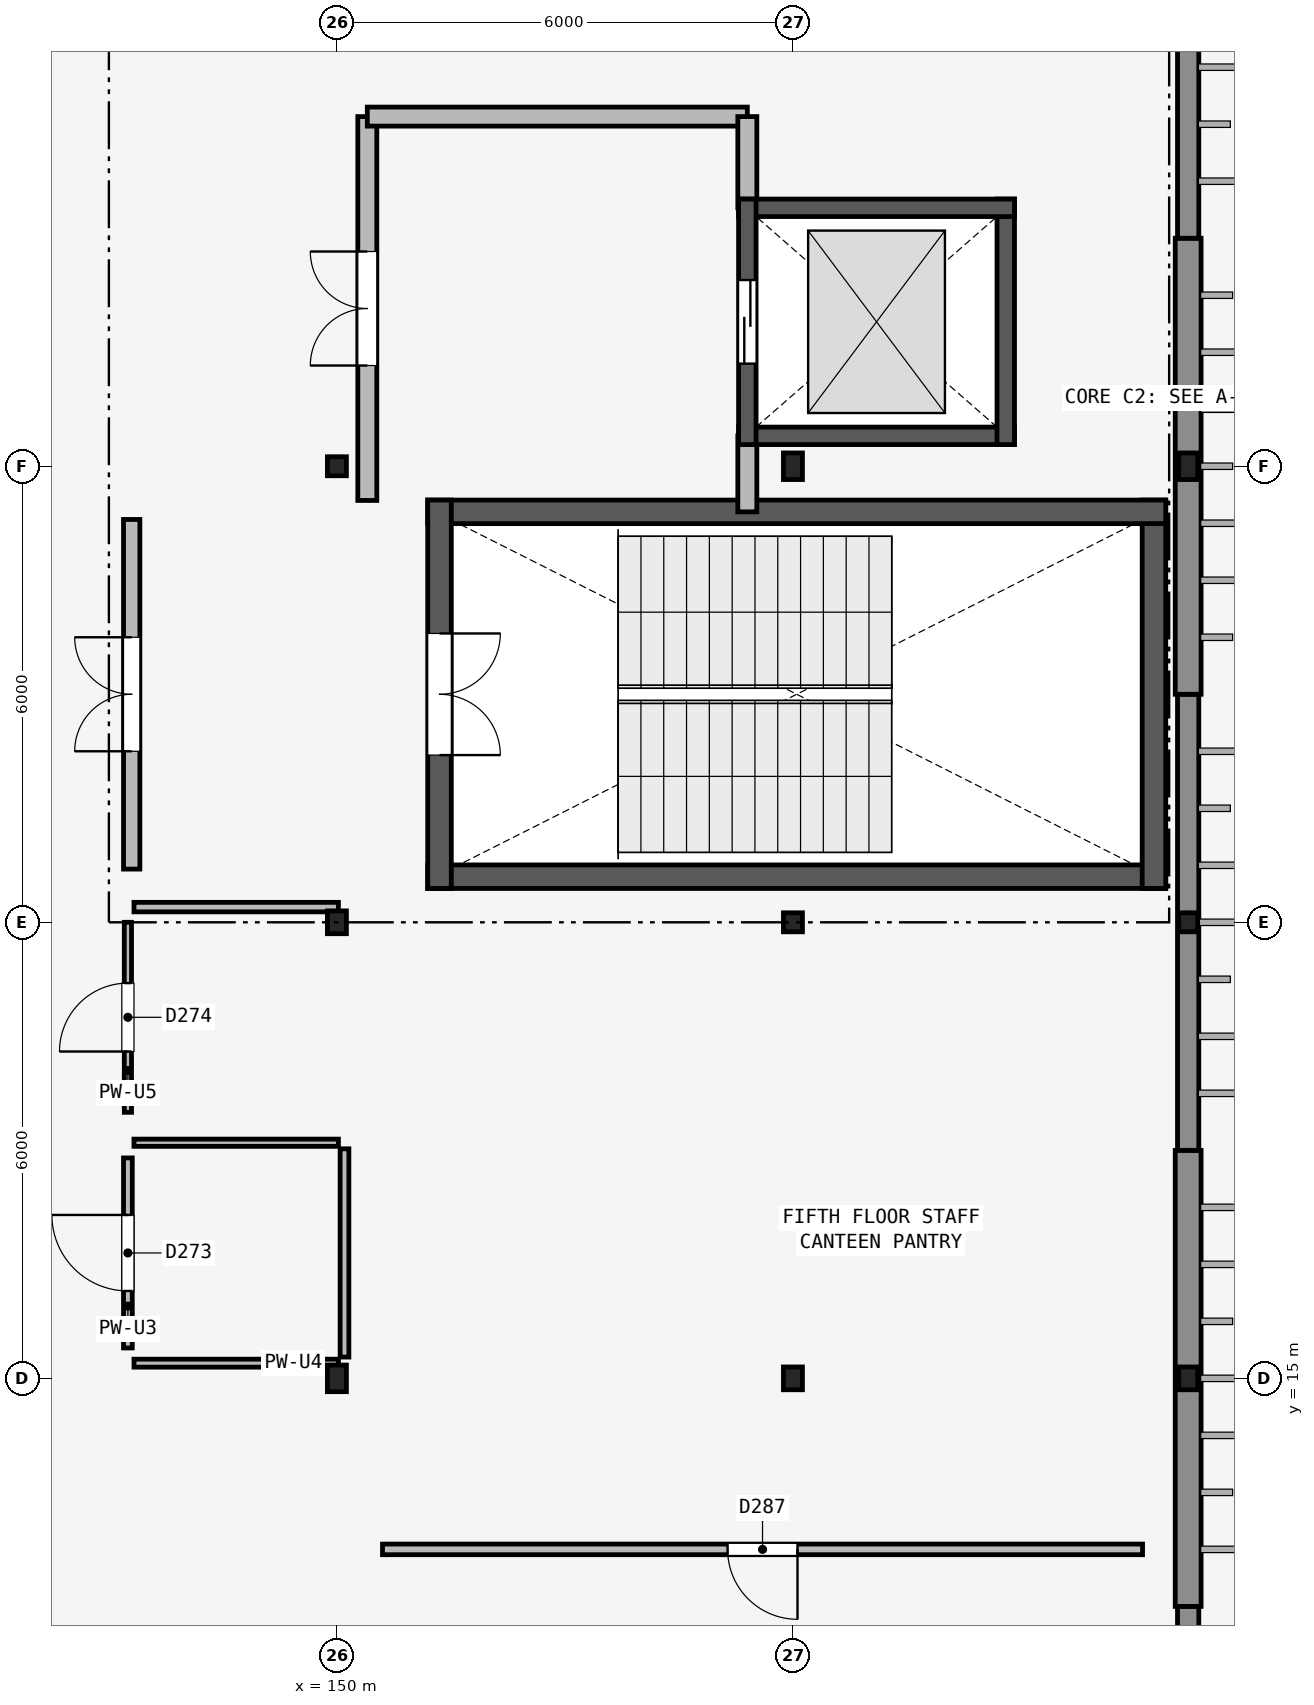
"""IFC4 building model, lengths in metres.
Left out: names, types, materials, properties, quantities, classifications, styles, units other than length and angle.
Written with IfcOpenShell. Run it as: python <this file> out.ifc"""

import sys

from ifc_helpers import new_model, si_unit, direction, frame, frame_2d, origin, origin_2d, place, context, subcontext, project, spatial, rectangle, hollow_rectangle, i_section, extrude, element, fill, save


model = new_model("IFC4")
c1 = context("Model", 3, precision=1e-05, world=origin(), true_north=direction((0.0, 1.0)))
c2 = subcontext(c1, "Body", "Model", "MODEL_VIEW")
j1 = project(units=[si_unit("LENGTHUNIT", "METRE"), si_unit("PLANEANGLEUNIT", "RADIAN")], contexts=[c1])
p1 = place(None, origin())
s1 = spatial("IfcSite", under=j1, at=p1, CompositionType="ELEMENT")
p2 = place(p1, origin())
s2 = spatial("IfcBuilding", under=s1, at=p2, CompositionType="ELEMENT")
p3 = place(p2, frame((0.0, 0.0, 22.2)))
s3 = spatial("IfcBuildingStorey", under=s2, at=p3, CompositionType="ELEMENT", Elevation=22.2)
p4 = place(p3, frame((150.0, 15.0, 0.0), z_axis=(0.0, 0.0, 1.0), x_axis=(1.0, 0.0, 0.0)))
e1 = element("IfcColumn", 1, at=p4, inside=s3, PredefinedType="COLUMN", context=c2, shape_type="SweptSolid", body=[
    extrude(i_section(OverallWidth=0.25, OverallDepth=0.35, WebThickness=0.01, FlangeThickness=0.012, FilletRadius=0.012, at=origin_2d()), origin(), (0.0, 0.0, 1.0), 3.9),
])
p5 = place(p3, frame((150.0, 21.0, 0.0), z_axis=(0.0, 0.0, 1.0), x_axis=(1.0, 0.0, 0.0)))
e2 = element("IfcColumn", 2, at=p5, inside=s3, PredefinedType="COLUMN", context=c2, shape_type="SweptSolid", body=[
    extrude(i_section(OverallWidth=0.25, OverallDepth=0.3, WebThickness=0.01, FlangeThickness=0.01, FilletRadius=0.012, at=origin_2d()), origin(), (0.0, 0.0, 1.0), 3.9),
])
p6 = place(p3, frame((150.0, 27.0, 0.0), z_axis=(0.0, 0.0, 1.0), x_axis=(1.0, 0.0, 0.0)))
e3 = element("IfcColumn", 3, at=p6, inside=s3, PredefinedType="COLUMN", context=c2, shape_type="SweptSolid", body=[
    extrude(hollow_rectangle(XDim=0.25, YDim=0.25, WallThickness=0.012, InnerFilletRadius=0.012, OuterFilletRadius=0.024, at=origin_2d()), origin(), (0.0, 0.0, 1.0), 3.9),
])
p7 = place(p3, frame((156.0, 15.0, 0.0), z_axis=(0.0, 0.0, 1.0), x_axis=(1.0, 0.0, 0.0)))
e4 = element("IfcColumn", 4, at=p7, inside=s3, PredefinedType="COLUMN", context=c2, shape_type="SweptSolid", body=[
    extrude(i_section(OverallWidth=0.25, OverallDepth=0.3, WebThickness=0.01, FlangeThickness=0.01, FilletRadius=0.012, at=origin_2d()), origin(), (0.0, 0.0, 1.0), 3.9),
])
p8 = place(p3, frame((156.0, 21.0, 0.0), z_axis=(0.0, 0.0, 1.0), x_axis=(1.0, 0.0, 0.0)))
e5 = element("IfcColumn", 5, at=p8, inside=s3, PredefinedType="COLUMN", context=c2, shape_type="SweptSolid", body=[
    extrude(hollow_rectangle(XDim=0.25, YDim=0.25, WallThickness=0.012, InnerFilletRadius=0.012, OuterFilletRadius=0.024, at=origin_2d()), origin(), (0.0, 0.0, 1.0), 3.9),
])
p9 = place(p3, frame((156.0, 27.0, 0.0), z_axis=(0.0, 0.0, 1.0), x_axis=(1.0, 0.0, 0.0)))
e6 = element("IfcColumn", 6, at=p9, inside=s3, PredefinedType="COLUMN", context=c2, shape_type="SweptSolid", body=[
    extrude(i_section(OverallWidth=0.25, OverallDepth=0.35, WebThickness=0.01, FlangeThickness=0.012, FilletRadius=0.012, at=origin_2d()), origin(), (0.0, 0.0, 1.0), 3.9),
])
p10 = place(p3, frame((161.2, 15.0, 0.0), z_axis=(0.0, 0.0, 1.0), x_axis=(1.0, 0.0, 0.0)))
e7 = element("IfcColumn", 7, at=p10, inside=s3, PredefinedType="COLUMN", context=c2, shape_type="SweptSolid", body=[
    extrude(i_section(OverallWidth=0.25, OverallDepth=0.3, WebThickness=0.01, FlangeThickness=0.01, FilletRadius=0.012, at=origin_2d()), origin(), (0.0, 0.0, 1.0), 3.9),
])
p11 = place(p3, frame((161.2, 21.0, 0.0), z_axis=(0.0, 0.0, 1.0), x_axis=(1.0, 0.0, 0.0)))
e8 = element("IfcColumn", 8, at=p11, inside=s3, PredefinedType="COLUMN", context=c2, shape_type="SweptSolid", body=[
    extrude(hollow_rectangle(XDim=0.25, YDim=0.25, WallThickness=0.012, InnerFilletRadius=0.012, OuterFilletRadius=0.024, at=origin_2d()), origin(), (0.0, 0.0, 1.0), 3.9),
])
p12 = place(p3, frame((161.2, 27.0, 0.0), z_axis=(0.0, 0.0, 1.0), x_axis=(1.0, 0.0, 0.0)))
e9 = element("IfcColumn", 9, at=p12, inside=s3, PredefinedType="COLUMN", context=c2, shape_type="SweptSolid", body=[
    extrude(i_section(OverallWidth=0.25, OverallDepth=0.35, WebThickness=0.01, FlangeThickness=0.012, FilletRadius=0.012, at=origin_2d()), origin(), (0.0, 0.0, 1.0), 3.9),
])
p13 = place(p3, frame((161.2, 6.0, 0.0), z_axis=(0.0, 0.0, 1.0), x_axis=(0.0, 1.0, 0.0)))
e10 = element("IfcWall", 10, at=p13, inside=s3, PredefinedType="SOLIDWALL", context=c2, shape_type="SweptSolid", body=[
    extrude(rectangle(XDim=6.0, YDim=0.28, at=frame_2d((3.0, 0.0))), origin(), (0.0, 0.0, 1.0), 3.08),
])
p14 = place(p3, frame((161.2, 12.0, 0.0), z_axis=(0.0, 0.0, 1.0), x_axis=(0.0, 1.0, 0.0)))
e11 = element("IfcWall", 11, at=p14, inside=s3, PredefinedType="SOLIDWALL", context=c2, shape_type="SweptSolid", body=[
    extrude(rectangle(XDim=6.0, YDim=0.34, at=frame_2d((3.0, 0.0))), origin(), (0.0, 0.0, 1.0), 3.08),
])
p15 = place(p3, frame((161.2, 18.0, 0.0), z_axis=(0.0, 0.0, 1.0), x_axis=(0.0, 1.0, 0.0)))
e12 = element("IfcWall", 12, at=p15, inside=s3, PredefinedType="SOLIDWALL", context=c2, shape_type="SweptSolid", body=[
    extrude(rectangle(XDim=6.0, YDim=0.28, at=frame_2d((3.0, 0.0))), origin(), (0.0, 0.0, 1.0), 3.08),
])
p16 = place(p3, frame((161.2, 24.0, 0.0), z_axis=(0.0, 0.0, 1.0), x_axis=(0.0, 1.0, 0.0)))
e13 = element("IfcWall", 13, at=p16, inside=s3, PredefinedType="SOLIDWALL", context=c2, shape_type="SweptSolid", body=[
    extrude(rectangle(XDim=6.0, YDim=0.34, at=frame_2d((3.0, 0.0))), origin(), (0.0, 0.0, 1.0), 3.08),
])
p17 = place(p3, frame((161.2, 30.0, 0.0), z_axis=(0.0, 0.0, 1.0), x_axis=(0.0, 1.0, 0.0)))
e14 = element("IfcWall", 14, at=p17, inside=s3, PredefinedType="SOLIDWALL", context=c2, shape_type="SweptSolid", body=[
    extrude(rectangle(XDim=6.0, YDim=0.28, at=frame_2d((3.0, 0.0))), origin(), (0.0, 0.0, 1.0), 3.08),
])
p18 = place(p3, frame((151.195, 21.6, 0.0), z_axis=(0.0, 0.0, 1.0), x_axis=(1.0, 0.0, 0.0)))
e15 = element("IfcWall", 15, at=p18, inside=s3, PredefinedType="SHEAR", context=c2, shape_type="SweptSolid", body=[
    extrude(rectangle(XDim=9.71, YDim=0.31, at=frame_2d((4.855, 0.0))), origin(), (0.0, 0.0, 1.0), 3.76),
])
p19 = place(p3, frame((160.75, 21.445, 0.0), z_axis=(0.0, 0.0, 1.0), x_axis=(0.0, 1.0, 0.0)))
e16 = element("IfcWall", 16, at=p19, inside=s3, PredefinedType="SHEAR", context=c2, shape_type="SweptSolid", body=[
    extrude(rectangle(XDim=5.11, YDim=0.31, at=frame_2d((2.555, 0.0))), origin(), (0.0, 0.0, 1.0), 3.76),
])
p20 = place(p3, frame((160.905, 26.4, 0.0), z_axis=(0.0, 0.0, 1.0), x_axis=(-1.0, 0.0, 0.0)))
e17 = element("IfcWall", 17, at=p20, inside=s3, PredefinedType="SHEAR", context=c2, shape_type="SweptSolid", body=[
    extrude(rectangle(XDim=9.71, YDim=0.31, at=frame_2d((4.855, 0.0))), origin(), (0.0, 0.0, 1.0), 3.76),
])
p21 = place(p3, frame((151.35, 26.555, 0.0), z_axis=(0.0, 0.0, 1.0), x_axis=(0.0, -1.0, 0.0)))
e18 = element("IfcWall", 18, at=p21, inside=s3, PredefinedType="SHEAR", context=c2, shape_type="SweptSolid", body=[
    extrude(rectangle(XDim=5.11, YDim=0.31, at=frame_2d((2.555, 0.0))), origin(), (0.0, 0.0, 1.0), 3.76),
])
p22 = place(p21, frame((1.755, 0.0, 0.0)))
e19 = element("IfcOpeningElement", 19, at=p22, cuts=e18, PredefinedType="OPENING", context=c2, shape_type="SweptSolid", body=[
    extrude(rectangle(XDim=1.6, YDim=2.2, at=frame_2d((0.8, 1.1))), frame((0.0, 0.165, 0.0), z_axis=(0.0, -1.0, 0.0), x_axis=(1.0, 0.0, 0.0)), (0.0, 0.0, 1.0), 0.33),
])
p23 = place(p3, frame((147.3, 21.7, 0.0), z_axis=(0.0, 0.0, 1.0), x_axis=(0.0, 1.0, 0.0)))
e20 = element("IfcWall", 20, at=p23, inside=s3, PredefinedType="PARTITIONING", context=c2, shape_type="SweptSolid", body=[
    extrude(rectangle(XDim=4.6, YDim=0.215, at=frame_2d((2.3, 0.0))), origin(), (0.0, 0.0, 1.0), 3.68),
])
p24 = place(p23, frame((1.55, 0.0, 0.0)))
e21 = element("IfcOpeningElement", 21, at=p24, cuts=e20, PredefinedType="OPENING", context=c2, shape_type="SweptSolid", body=[
    extrude(rectangle(XDim=1.5, YDim=2.15, at=frame_2d((0.75, 1.075))), frame((0.0, 0.117, 0.0), z_axis=(0.0, -1.0, 0.0), x_axis=(1.0, 0.0, 0.0)), (0.0, 0.0, 1.0), 0.235),
])
p25 = place(p3, frame((150.4, 26.55, 0.0), z_axis=(0.0, 0.0, 1.0), x_axis=(0.0, 1.0, 0.0)))
e22 = element("IfcWall", 22, at=p25, inside=s3, PredefinedType="PARTITIONING", context=c2, shape_type="SweptSolid", body=[
    extrude(rectangle(XDim=5.05, YDim=0.25, at=frame_2d((2.525, 0.0))), origin(), (0.0, 0.0, 1.0), 3.18),
])
p26 = place(p25, frame((1.775, 0.0, 0.0)))
e23 = element("IfcOpeningElement", 23, at=p26, cuts=e22, PredefinedType="OPENING", context=c2, shape_type="SweptSolid", body=[
    extrude(rectangle(XDim=1.5, YDim=2.15, at=frame_2d((0.75, 1.075))), frame((0.0, 0.135, 0.0), z_axis=(0.0, -1.0, 0.0), x_axis=(1.0, 0.0, 0.0)), (0.0, 0.0, 1.0), 0.27),
])
p27 = place(p3, frame((150.4, 31.6, 0.0), z_axis=(0.0, 0.0, 1.0), x_axis=(1.0, 0.0, 0.0)))
e24 = element("IfcWall", 24, at=p27, inside=s3, PredefinedType="PARTITIONING", context=c2, shape_type="SweptSolid", body=[
    extrude(rectangle(XDim=5.0, YDim=0.25, at=frame_2d((2.5, 0.0))), origin(), (0.0, 0.0, 1.0), 3.38),
])
p28 = place(p3, frame((155.4, 30.4, 0.0), z_axis=(0.0, 0.0, 1.0), x_axis=(0.0, 1.0, 0.0)))
e25 = element("IfcWall", 25, at=p28, inside=s3, PredefinedType="PARTITIONING", context=c2, shape_type="SweptSolid", body=[
    extrude(rectangle(XDim=1.2, YDim=0.25, at=frame_2d((0.6, 0.0))), origin(), (0.0, 0.0, 1.0), 3.68),
])
p29 = place(p3, frame((155.4, 26.4, 0.0), z_axis=(0.0, 0.0, 1.0), x_axis=(0.0, 1.0, 0.0)))
e26 = element("IfcWall", 26, at=p29, inside=s3, PredefinedType="PARTITIONING", context=c2, shape_type="SweptSolid", body=[
    extrude(rectangle(XDim=1.0, YDim=0.25, at=frame_2d((0.5, 0.0))), origin(), (0.0, 0.0, 1.0), 3.18),
])
p30 = place(p3, frame((155.285, 27.4, 0.0), z_axis=(0.0, 0.0, 1.0), x_axis=(1.0, 0.0, 0.0)))
e27 = element("IfcWall", 27, at=p30, inside=s3, PredefinedType="SHEAR", context=c2, shape_type="SweptSolid", body=[
    extrude(rectangle(XDim=3.63, YDim=0.23, at=frame_2d((1.815, 0.0))), origin(), (0.0, 0.0, 1.0), 3.9),
])
p31 = place(p3, frame((158.8, 27.285, 0.0), z_axis=(0.0, 0.0, 1.0), x_axis=(0.0, 1.0, 0.0)))
e28 = element("IfcWall", 28, at=p31, inside=s3, PredefinedType="SHEAR", context=c2, shape_type="SweptSolid", body=[
    extrude(rectangle(XDim=3.23, YDim=0.23, at=frame_2d((1.615, 0.0))), origin(), (0.0, 0.0, 1.0), 3.9),
])
p32 = place(p3, frame((158.915, 30.4, 0.0), z_axis=(0.0, 0.0, 1.0), x_axis=(-1.0, 0.0, 0.0)))
e29 = element("IfcWall", 29, at=p32, inside=s3, PredefinedType="SHEAR", context=c2, shape_type="SweptSolid", body=[
    extrude(rectangle(XDim=3.63, YDim=0.23, at=frame_2d((1.815, 0.0))), origin(), (0.0, 0.0, 1.0), 3.9),
])
p33 = place(p3, frame((155.4, 30.515, 0.0), z_axis=(0.0, 0.0, 1.0), x_axis=(0.0, -1.0, 0.0)))
e30 = element("IfcWall", 30, at=p33, inside=s3, PredefinedType="SHEAR", context=c2, shape_type="SweptSolid", body=[
    extrude(rectangle(XDim=3.23, YDim=0.23, at=frame_2d((1.615, 0.0))), origin(), (0.0, 0.0, 1.0), 3.9),
])
p34 = place(p33, frame((1.065, 0.0, 0.0)))
e31 = element("IfcOpeningElement", 31, at=p34, cuts=e30, PredefinedType="OPENING", context=c2, shape_type="SweptSolid", body=[
    extrude(rectangle(XDim=1.1, YDim=2.2, at=frame_2d((0.55, 1.1))), frame((0.0, 0.125, 0.0), z_axis=(0.0, -1.0, 0.0), x_axis=(1.0, 0.0, 0.0)), (0.0, 0.0, 1.0), 0.25),
])
p35 = place(p3, frame((147.25, 15.4, 0.0), z_axis=(0.0, 0.0, 1.0), x_axis=(0.0, 1.0, 0.0)))
e32 = element("IfcWall", 32, at=p35, inside=s3, PredefinedType="PARTITIONING", context=c2, shape_type="SweptSolid", body=[
    extrude(rectangle(XDim=2.5, YDim=0.115, at=frame_2d((1.25, 0.0))), origin(), (0.0, 0.0, 1.0), 3.68),
])
p36 = place(p35, frame((0.75, 0.0, 0.0)))
e33 = element("IfcOpeningElement", 33, at=p36, cuts=e32, PredefinedType="OPENING", context=c2, shape_type="SweptSolid", body=[
    extrude(rectangle(XDim=1.0, YDim=2.1, at=frame_2d((0.5, 1.05))), frame((0.0, 0.067, 0.0), z_axis=(0.0, -1.0, 0.0), x_axis=(1.0, 0.0, 0.0)), (0.0, 0.0, 1.0), 0.135),
])
p37 = place(p3, frame((147.25, 18.5, 0.0), z_axis=(0.0, 0.0, 1.0), x_axis=(0.0, 1.0, 0.0)))
e34 = element("IfcWall", 34, at=p37, inside=s3, PredefinedType="PARTITIONING", context=c2, shape_type="SweptSolid", body=[
    extrude(rectangle(XDim=2.5, YDim=0.095, at=frame_2d((1.25, 0.0))), origin(), (0.0, 0.0, 1.0), 3.08),
])
p38 = place(p37, frame((0.8, 0.0, 0.0)))
e35 = element("IfcOpeningElement", 35, at=p38, cuts=e34, PredefinedType="OPENING", context=c2, shape_type="SweptSolid", body=[
    extrude(rectangle(XDim=0.9, YDim=2.1, at=frame_2d((0.45, 1.05))), frame((0.0, 0.057, 0.0), z_axis=(0.0, -1.0, 0.0), x_axis=(1.0, 0.0, 0.0)), (0.0, 0.0, 1.0), 0.115),
])
p39 = place(p3, frame((160.6, 12.75, 0.0), z_axis=(0.0, 0.0, 1.0), x_axis=(-1.0, 0.0, 0.0)))
e36 = element("IfcWall", 36, at=p39, inside=s3, PredefinedType="PARTITIONING", context=c2, shape_type="SweptSolid", body=[
    extrude(rectangle(XDim=10.0, YDim=0.14, at=frame_2d((5.0, 0.0))), origin(), (0.0, 0.0, 1.0), 3.28),
])
p40 = place(p39, frame((4.54, 0.0, 0.0)))
e37 = element("IfcOpeningElement", 37, at=p40, cuts=e36, PredefinedType="OPENING", context=c2, shape_type="SweptSolid", body=[
    extrude(rectangle(XDim=0.92, YDim=2.1, at=frame_2d((0.46, 1.05))), frame((0.0, 0.08, 0.0), z_axis=(0.0, -1.0, 0.0), x_axis=(1.0, 0.0, 0.0)), (0.0, 0.0, 1.0), 0.16),
])
p41 = place(p3, frame((150.1, 18.02, 0.0), z_axis=(0.0, 0.0, 1.0), x_axis=(0.0, -1.0, 0.0)))
e38 = element("IfcWall", 38, at=p41, inside=s3, PredefinedType="PARTITIONING", context=c2, shape_type="SweptSolid", body=[
    extrude(rectangle(XDim=2.74, YDim=0.115, at=frame_2d((1.37, 0.0))), origin(), (0.0, 0.0, 1.0), 3.274),
])
p42 = place(p3, frame((150.02, 15.2, 0.0), z_axis=(0.0, 0.0, 1.0), x_axis=(-1.0, 0.0, 0.0)))
e39 = element("IfcWall", 39, at=p42, inside=s3, PredefinedType="PARTITIONING", context=c2, shape_type="SweptSolid", body=[
    extrude(rectangle(XDim=2.69, YDim=0.105, at=frame_2d((1.345, 0.0))), origin(), (0.0, 0.0, 1.0), 3.08),
])
p43 = place(p3, frame((147.33, 18.1, 0.0), z_axis=(0.0, 0.0, 1.0), x_axis=(1.0, 0.0, 0.0)))
e40 = element("IfcWall", 40, at=p43, inside=s3, PredefinedType="PARTITIONING", context=c2, shape_type="SweptSolid", body=[
    extrude(rectangle(XDim=2.69, YDim=0.095, at=frame_2d((1.345, 0.0))), origin(), (0.0, 0.0, 1.0), 3.274),
])
p44 = place(p3, frame((147.33, 21.2, 0.0), z_axis=(0.0, 0.0, 1.0), x_axis=(1.0, 0.0, 0.0)))
e41 = element("IfcWall", 41, at=p44, inside=s3, PredefinedType="PARTITIONING", context=c2, shape_type="SweptSolid", body=[
    extrude(rectangle(XDim=2.69, YDim=0.125, at=frame_2d((1.345, 0.0))), origin(), (0.0, 0.0, 1.0), 3.08),
])
p45 = place(p22, origin())
e42 = element("IfcDoor", 42, at=p45, inside=s3, OperationType="DOUBLE_DOOR_SINGLE_SWING", PredefinedType="DOOR", context=c2, shape_type="SweptSolid", body=[
    extrude(rectangle(XDim=1.6, YDim=2.2, at=frame_2d((0.8, 1.1))), frame((0.0, 0.025, 0.0), z_axis=(0.0, -1.0, 0.0), x_axis=(1.0, 0.0, 0.0)), (0.0, 0.0, 1.0), 0.05),
])
fill(e19, e42)
p46 = place(p24, origin())
e43 = element("IfcDoor", 43, at=p46, inside=s3, OperationType="DOUBLE_DOOR_SINGLE_SWING", PredefinedType="DOOR", context=c2, shape_type="SweptSolid", body=[
    extrude(rectangle(XDim=1.5, YDim=2.15, at=frame_2d((0.75, 1.075))), frame((0.0, 0.025, 0.0), z_axis=(0.0, -1.0, 0.0), x_axis=(1.0, 0.0, 0.0)), (0.0, 0.0, 1.0), 0.05),
])
fill(e21, e43)
p47 = place(p26, origin())
e44 = element("IfcDoor", 44, at=p47, inside=s3, OperationType="DOUBLE_DOOR_SINGLE_SWING", PredefinedType="DOOR", context=c2, shape_type="SweptSolid", body=[
    extrude(rectangle(XDim=1.5, YDim=2.15, at=frame_2d((0.75, 1.075))), frame((0.0, 0.025, 0.0), z_axis=(0.0, -1.0, 0.0), x_axis=(1.0, 0.0, 0.0)), (0.0, 0.0, 1.0), 0.05),
])
fill(e23, e44)
p48 = place(p34, origin())
e45 = element("IfcDoor", 45, at=p48, inside=s3, OperationType="SLIDING_TO_LEFT", PredefinedType="DOOR", context=c2, shape_type="SweptSolid", body=[
    extrude(rectangle(XDim=1.1, YDim=2.2, at=frame_2d((0.55, 1.1))), frame((0.0, 0.025, 0.0), z_axis=(0.0, -1.0, 0.0), x_axis=(1.0, 0.0, 0.0)), (0.0, 0.0, 1.0), 0.05),
])
fill(e31, e45)
p49 = place(p36, origin())
e46 = element("IfcDoor", 46, at=p49, inside=s3, OperationType="SINGLE_SWING_RIGHT", PredefinedType="DOOR", context=c2, shape_type="SweptSolid", body=[
    extrude(rectangle(XDim=1.0, YDim=2.1, at=frame_2d((0.5, 1.05))), frame((0.0, 0.025, 0.0), z_axis=(0.0, -1.0, 0.0), x_axis=(1.0, 0.0, 0.0)), (0.0, 0.0, 1.0), 0.05),
])
fill(e33, e46)
p50 = place(p38, origin())
e47 = element("IfcDoor", 47, at=p50, inside=s3, OperationType="SINGLE_SWING_LEFT", PredefinedType="DOOR", context=c2, shape_type="SweptSolid", body=[
    extrude(rectangle(XDim=0.9, YDim=2.1, at=frame_2d((0.45, 1.05))), frame((0.0, 0.025, 0.0), z_axis=(0.0, -1.0, 0.0), x_axis=(1.0, 0.0, 0.0)), (0.0, 0.0, 1.0), 0.05),
])
fill(e35, e47)
p51 = place(p40, origin())
e48 = element("IfcDoor", 48, at=p51, inside=s3, OperationType="SINGLE_SWING_LEFT", PredefinedType="DOOR", context=c2, shape_type="SweptSolid", body=[
    extrude(rectangle(XDim=0.92, YDim=2.1, at=frame_2d((0.46, 1.05))), frame((0.0, 0.025, 0.0), z_axis=(0.0, -1.0, 0.0), x_axis=(1.0, 0.0, 0.0)), (0.0, 0.0, 1.0), 0.05),
])
fill(e37, e48)
save(model, sys.argv[1])
